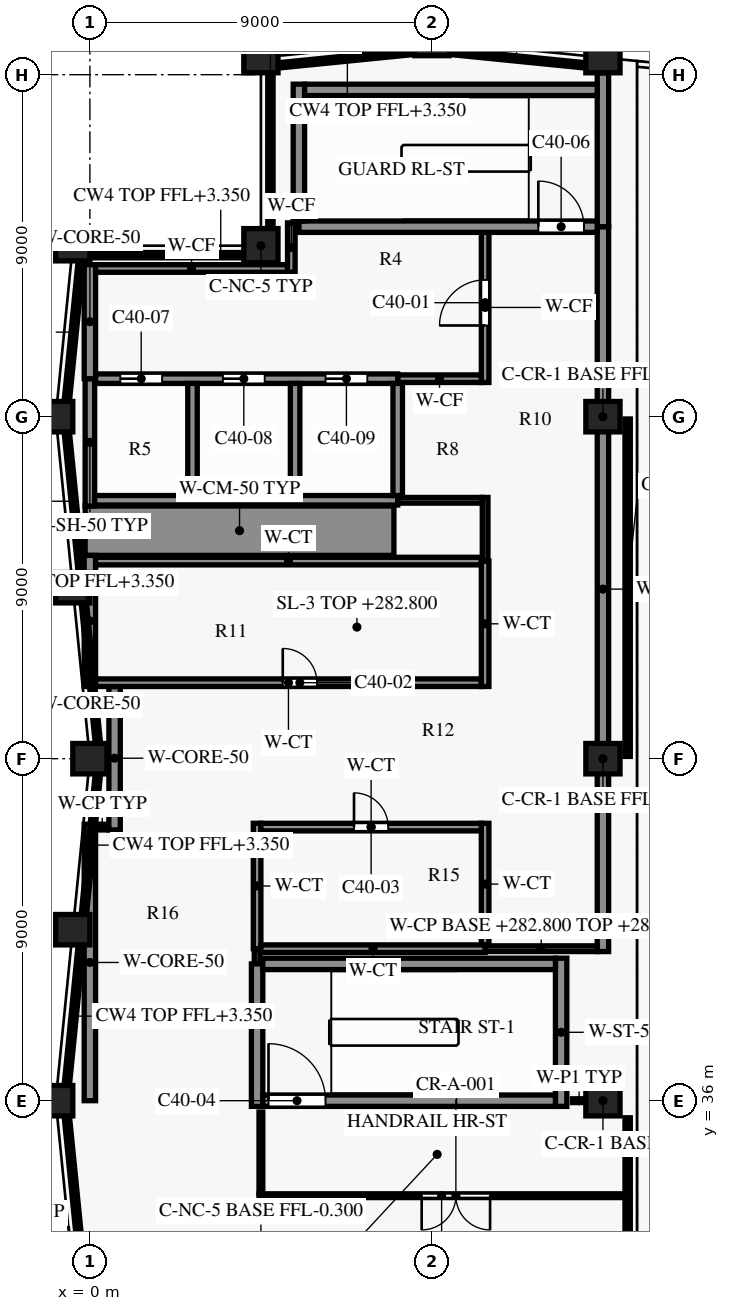
"""IFC4 building model, lengths in metres.
Left out: names, types, materials, properties, quantities, classifications, styles, units other than length and angle.
Written with IfcOpenShell. Run it as: python <this file> out.ifc"""

import sys

from ifc_helpers import new_model, si_unit, direction, frame, frame_2d, origin, origin_2d, place, context, subcontext, project, spatial, rectangle, extrude, element, fill, save


model = new_model("IFC4")
c1 = context("Model", 3, precision=1e-05, world=origin(), true_north=direction((0.0, 1.0)))
c2 = subcontext(c1, "Body", "Model", "MODEL_VIEW")
j1 = project(units=[si_unit("LENGTHUNIT", "METRE"), si_unit("PLANEANGLEUNIT", "RADIAN")], contexts=[c1])
p1 = place(None, origin())
s1 = spatial("IfcSite", under=j1, at=p1, CompositionType="ELEMENT")
p2 = place(p1, origin())
s2 = spatial("IfcBuilding", under=s1, at=p2, CompositionType="ELEMENT")
p3 = place(p2, frame((0.0, 0.0, 282.8)))
s3 = spatial("IfcBuildingStorey", under=s2, at=p3, CompositionType="ELEMENT", Elevation=282.8)
for number, where, z_axis, x_axis in (
    (1, (13.5, 36.0, -0.3), (0.0, 0.0, 1.0), (1.0, 0.0, 0.0)),
    (2, (13.5, 45.0, -0.3), (0.0, 0.0, 1.0), (1.0, 0.0, 0.0)),
    (3, (13.5, 54.0, -0.3), (0.0, 0.0, 1.0), (1.0, 0.0, 0.0)),
):
    element("IfcColumn", number, at=place(p3, frame(where, z_axis=z_axis, x_axis=x_axis)), inside=s3, PredefinedType="COLUMN", context=c2, shape_type="SweptSolid", body=[
        extrude(rectangle(XDim=0.9, YDim=0.8, at=origin_2d()), origin(), (0.0, 0.0, 1.0), 4.3),
    ])
for number, where, z_axis, x_axis in (
    (4, (13.5, 63.45, 0.0), (0.0, 0.0, 1.0), (-0.995, 0.1, 0.0)),
    (5, (9.0, 63.9, 0.0), (0.0, 0.0, 1.0), (-1.0, 0.0, 0.0)),
    (6, (4.5, 63.45, 0.0), (0.0, 0.0, 1.0), (-0.995, -0.1, 0.0)),
    (7, (-0.45, 58.5, 0.0), (0.0, 0.0, 1.0), (-0.1, -0.995, 0.0)),
    (8, (-0.9, 54.0, 0.0), (0.0, 0.0, 1.0), (0.0, -1.0, 0.0)),
    (9, (-0.45, 49.5, 0.0), (0.0, 0.0, 1.0), (0.1, -0.995, 0.0)),
    (10, (0.0, 45.0, 0.0), (0.0, 0.0, 1.0), (0.0, -1.0, 0.0)),
    (11, (-0.45, 40.5, 0.0), (0.0, 0.0, 1.0), (-0.1, -0.995, 0.0)),
    (12, (-0.9, 36.0, 0.0), (0.0, 0.0, 1.0), (0.0, -1.0, 0.0)),
):
    element("IfcColumn", number, at=place(p3, frame(where, z_axis=z_axis, x_axis=x_axis)), inside=s3, PredefinedType="COLUMN", context=c2, shape_type="SweptSolid", body=[
        extrude(rectangle(XDim=0.9, YDim=0.8, at=origin_2d()), origin(), (0.0, 0.0, 1.0), 4.0),
    ])
p4 = place(p3, frame((4.5, 58.5, 0.0), z_axis=(0.0, 0.0, 1.0), x_axis=(1.0, 0.0, 0.0)))
e13 = element("IfcColumn", 13, at=p4, inside=s3, PredefinedType="COLUMN", context=c2, shape_type="SweptSolid", body=[
    extrude(rectangle(XDim=0.9, YDim=0.9, at=origin_2d()), origin(), (0.0, 0.0, 1.0), 4.0),
])
p5 = place(p3, frame((4.55, 36.0, 0.0), z_axis=(0.0, 0.0, 1.0), x_axis=(1.0, 0.0, 0.0)))
e14 = element("IfcWall", 14, at=p5, inside=s3, PredefinedType="SHEAR", context=c2, shape_type="SweptSolid", body=[
    extrude(rectangle(XDim=7.7, YDim=0.3, at=frame_2d((3.85, 0.0))), origin(), (0.0, 0.0, 1.0), 3.7),
])
p6 = place(p5, frame((0.15, 0.0, 0.0)))
e15 = element("IfcOpeningElement", 15, at=p6, cuts=e14, PredefinedType="OPENING", context=c2, shape_type="SweptSolid", body=[
    extrude(rectangle(XDim=1.5, YDim=2.2, at=frame_2d((0.75, 1.1))), frame((0.0, 0.16, 0.0), z_axis=(0.0, -1.0, 0.0), x_axis=(1.0, 0.0, 0.0)), (0.0, 0.0, 1.0), 0.32),
])
p7 = place(p3, frame((4.55, 39.6, 0.0), z_axis=(0.0, 0.0, 1.0), x_axis=(1.0, 0.0, 0.0)))
e16 = element("IfcWall", 16, at=p7, inside=s3, PredefinedType="SHEAR", context=c2, shape_type="SweptSolid", body=[
    extrude(rectangle(XDim=7.7, YDim=0.3, at=frame_2d((3.85, 0.0))), origin(), (0.0, 0.0, 1.0), 3.7),
])
p8 = place(p3, frame((10.4, 40.0, 0.0), z_axis=(0.0, 0.0, 1.0), x_axis=(1.0, 0.0, 0.0)))
e17 = element("IfcWall", 17, at=p8, inside=s3, PredefinedType="PARTITIONING", context=c2, shape_type="SweptSolid", body=[
    extrude(rectangle(XDim=2.95, YDim=0.15, at=frame_2d((1.475, 0.0))), origin(), (0.0, 0.0, 1.0), 3.35),
])
p9 = place(p3, frame((4.5, 40.0, 0.0), z_axis=(0.0, 0.0, 1.0), x_axis=(1.0, 0.0, 0.0)))
e18 = element("IfcWall", 18, at=p9, inside=s3, PredefinedType="PARTITIONING", context=c2, shape_type="SweptSolid", body=[
    extrude(rectangle(XDim=5.9, YDim=0.2, at=frame_2d((2.95, 0.0))), origin(), (0.0, 0.0, 1.0), 3.7),
])
p10 = place(p3, frame((0.15, 43.2, 0.0), z_axis=(0.0, 0.0, 1.0), x_axis=(1.0, 0.0, 0.0)))
e19 = element("IfcWall", 19, at=p10, inside=s3, PredefinedType="PARTITIONING", context=c2, shape_type="SweptSolid", body=[
    extrude(rectangle(XDim=0.35, YDim=0.15, at=frame_2d((0.175, 0.0))), origin(), (0.0, 0.0, 1.0), 3.7),
])
p11 = place(p3, frame((4.5, 43.2, 0.0), z_axis=(0.0, 0.0, 1.0), x_axis=(1.0, 0.0, 0.0)))
e20 = element("IfcWall", 20, at=p11, inside=s3, PredefinedType="PARTITIONING", context=c2, shape_type="SweptSolid", body=[
    extrude(rectangle(XDim=5.8, YDim=0.2, at=frame_2d((2.9, 0.0))), origin(), (0.0, 0.0, 1.0), 3.7),
])
p12 = place(p11, frame((2.45, 0.0, 0.0)))
e21 = element("IfcOpeningElement", 21, at=p12, cuts=e20, PredefinedType="OPENING", context=c2, shape_type="SweptSolid", body=[
    extrude(rectangle(XDim=0.9, YDim=2.1, at=frame_2d((0.45, 1.05))), frame((0.0, 0.11, 0.0), z_axis=(0.0, -1.0, 0.0), x_axis=(1.0, 0.0, 0.0)), (0.0, 0.0, 1.0), 0.22),
])
p13 = place(p3, frame((0.15, 47.0, 0.0), z_axis=(0.0, 0.0, 1.0), x_axis=(1.0, 0.0, 0.0)))
e22 = element("IfcWall", 22, at=p13, inside=s3, PredefinedType="PARTITIONING", context=c2, shape_type="SweptSolid", body=[
    extrude(rectangle(XDim=10.15, YDim=0.2, at=frame_2d((5.075, 0.0))), origin(), (0.0, 0.0, 1.0), 3.7),
])
p14 = place(p13, frame((4.925, 0.0, 0.0)))
e23 = element("IfcOpeningElement", 23, at=p14, cuts=e22, PredefinedType="OPENING", context=c2, shape_type="SweptSolid", body=[
    extrude(rectangle(XDim=0.9, YDim=2.1, at=frame_2d((0.45, 1.05))), frame((0.0, 0.11, 0.0), z_axis=(0.0, -1.0, 0.0), x_axis=(1.0, 0.0, 0.0)), (0.0, 0.0, 1.0), 0.22),
])
p15 = place(p3, frame((0.15, 50.2, 0.0), z_axis=(0.0, 0.0, 1.0), x_axis=(1.0, 0.0, 0.0)))
e24 = element("IfcWall", 24, at=p15, inside=s3, PredefinedType="PARTITIONING", context=c2, shape_type="SweptSolid", body=[
    extrude(rectangle(XDim=10.15, YDim=0.2, at=frame_2d((5.075, 0.0))), origin(), (0.0, 0.0, 1.0), 3.7),
])
p16 = place(p3, frame((-0.125, 51.0, 0.0), z_axis=(0.0, 0.0, 1.0), x_axis=(1.0, 0.0, 0.0)))
e25 = element("IfcWall", 25, at=p16, inside=s3, PredefinedType="SHEAR", context=c2, shape_type="SweptSolid", body=[
    extrude(rectangle(XDim=8.125, YDim=1.3, at=frame_2d((4.062, 0.0))), origin(), (0.0, 0.0, 1.0), 3.7),
])
p17 = place(p3, frame((8.1, 51.8, 0.0), z_axis=(0.0, 0.0, 1.0), x_axis=(1.0, 0.0, 0.0)))
e26 = element("IfcWall", 26, at=p17, inside=s3, PredefinedType="PARTITIONING", context=c2, shape_type="SweptSolid", body=[
    extrude(rectangle(XDim=2.225, YDim=0.15, at=frame_2d((1.112, 0.0))), origin(), (0.0, 0.0, 1.0), 3.7),
])
p18 = place(p3, frame((0.125, 51.8, 0.0), z_axis=(0.0, 0.0, 1.0), x_axis=(1.0, 0.0, 0.0)))
e27 = element("IfcWall", 27, at=p18, inside=s3, PredefinedType="SHEAR", context=c2, shape_type="SweptSolid", body=[
    extrude(rectangle(XDim=7.975, YDim=0.25, at=frame_2d((3.988, 0.0))), origin(), (0.0, 0.0, 1.0), 3.7),
])
p19 = place(p3, frame((8.1, 55.0, 0.0), z_axis=(0.0, 0.0, 1.0), x_axis=(1.0, 0.0, 0.0)))
e28 = element("IfcWall", 28, at=p19, inside=s3, PredefinedType="PARTITIONING", context=c2, shape_type="SweptSolid", body=[
    extrude(rectangle(XDim=2.2, YDim=0.2, at=frame_2d((1.1, 0.0))), origin(), (0.0, 0.0, 1.0), 3.7),
])
p20 = place(p3, frame((0.15, 55.0, 0.0), z_axis=(0.0, 0.0, 1.0), x_axis=(1.0, 0.0, 0.0)))
e29 = element("IfcWall", 29, at=p20, inside=s3, PredefinedType="SHEAR", context=c2, shape_type="SweptSolid", body=[
    extrude(rectangle(XDim=7.95, YDim=0.25, at=frame_2d((3.975, 0.0))), origin(), (0.0, 0.0, 1.0), 3.7),
])
p21 = place(p20, frame((0.65, 0.0, 0.0)))
e30 = element("IfcOpeningElement", 30, at=p21, cuts=e29, PredefinedType="OPENING", context=c2, shape_type="SweptSolid", body=[
    extrude(rectangle(XDim=1.1, YDim=2.1, at=frame_2d((0.55, 1.05))), frame((0.0, 0.135, 0.0), z_axis=(0.0, -1.0, 0.0), x_axis=(1.0, 0.0, 0.0)), (0.0, 0.0, 1.0), 0.27),
])
p22 = place(p20, frame((3.35, 0.0, 0.0)))
e31 = element("IfcOpeningElement", 31, at=p22, cuts=e29, PredefinedType="OPENING", context=c2, shape_type="SweptSolid", body=[
    extrude(rectangle(XDim=1.1, YDim=2.1, at=frame_2d((0.55, 1.05))), frame((0.0, 0.135, 0.0), z_axis=(0.0, -1.0, 0.0), x_axis=(1.0, 0.0, 0.0)), (0.0, 0.0, 1.0), 0.27),
])
p23 = place(p20, frame((6.05, 0.0, 0.0)))
e32 = element("IfcOpeningElement", 32, at=p23, cuts=e29, PredefinedType="OPENING", context=c2, shape_type="SweptSolid", body=[
    extrude(rectangle(XDim=1.1, YDim=2.1, at=frame_2d((0.55, 1.05))), frame((0.0, 0.135, 0.0), z_axis=(0.0, -1.0, 0.0), x_axis=(1.0, 0.0, 0.0)), (0.0, 0.0, 1.0), 0.27),
])
p24 = place(p3, frame((0.15, 57.9, 0.0), z_axis=(0.0, 0.0, 1.0), x_axis=(1.0, 0.0, 0.0)))
e33 = element("IfcWall", 33, at=p24, inside=s3, PredefinedType="PARTITIONING", context=c2, shape_type="SweptSolid", body=[
    extrude(rectangle(XDim=5.05, YDim=0.2, at=frame_2d((2.525, 0.0))), origin(), (0.0, 0.0, 1.0), 3.7),
])
p25 = place(p3, frame((5.5, 59.0, 0.0), z_axis=(0.0, 0.0, 1.0), x_axis=(1.0, 0.0, 0.0)))
e34 = element("IfcWall", 34, at=p25, inside=s3, PredefinedType="SHEAR", context=c2, shape_type="SweptSolid", body=[
    extrude(rectangle(XDim=7.85, YDim=0.3, at=frame_2d((3.925, 0.0))), origin(), (0.0, 0.0, 1.0), 3.7),
])
p26 = place(p25, frame((6.3, 0.0, 0.0)))
e35 = element("IfcOpeningElement", 35, at=p26, cuts=e34, PredefinedType="OPENING", context=c2, shape_type="SweptSolid", body=[
    extrude(rectangle(XDim=1.2, YDim=2.2, at=frame_2d((0.6, 1.1))), frame((0.0, 0.16, 0.0), z_axis=(0.0, -1.0, 0.0), x_axis=(1.0, 0.0, 0.0)), (0.0, 0.0, 1.0), 0.32),
])
p27 = place(p3, frame((5.65, 62.6, 0.0), z_axis=(0.0, 0.0, 1.0), x_axis=(1.0, 0.0, 0.0)))
e36 = element("IfcWall", 36, at=p27, inside=s3, PredefinedType="SHEAR", context=c2, shape_type="SweptSolid", body=[
    extrude(rectangle(XDim=7.7, YDim=0.3, at=frame_2d((3.85, 0.0))), origin(), (0.0, 0.0, 1.0), 3.7),
])
p28 = place(p3, frame((0.0, 36.0, 0.0), z_axis=(0.0, 0.0, 1.0), x_axis=(0.0, 1.0, 0.0)))
e37 = element("IfcWall", 37, at=p28, inside=s3, PredefinedType="SHEAR", context=c2, shape_type="SweptSolid", body=[
    extrude(rectangle(XDim=7.275, YDim=0.3, at=frame_2d((3.637, 0.0))), origin(), (0.0, 0.0, 1.0), 3.7),
])
p29 = place(p3, frame((0.0, 46.9, 0.0), z_axis=(0.0, 0.0, 1.0), x_axis=(0.0, 1.0, 0.0)))
e38 = element("IfcWall", 38, at=p29, inside=s3, PredefinedType="SHEAR", context=c2, shape_type="SweptSolid", body=[
    extrude(rectangle(XDim=3.45, YDim=0.3, at=frame_2d((1.725, 0.0))), origin(), (0.0, 0.0, 1.0), 3.7),
])
p30 = place(p3, frame((0.0, 55.0, 0.0), z_axis=(0.0, 0.0, 1.0), x_axis=(0.0, 1.0, 0.0)))
e39 = element("IfcWall", 39, at=p30, inside=s3, PredefinedType="SHEAR", context=c2, shape_type="SweptSolid", body=[
    extrude(rectangle(XDim=3.0, YDim=0.3, at=frame_2d((1.5, 0.0))), origin(), (0.0, 0.0, 1.0), 3.7),
])
p31 = place(p3, frame((0.0, 51.65, 0.0), z_axis=(0.0, 0.0, 1.0), x_axis=(0.0, 1.0, 0.0)))
e40 = element("IfcWall", 40, at=p31, inside=s3, PredefinedType="SHEAR", context=c2, shape_type="SweptSolid", body=[
    extrude(rectangle(XDim=3.35, YDim=0.25, at=frame_2d((1.675, 0.0))), origin(), (0.0, 0.0, 1.0), 3.7),
])
p32 = place(p3, frame((0.65, 43.125, 0.0), z_axis=(0.0, 0.0, 1.0), x_axis=(0.0, 1.0, 0.0)))
e41 = element("IfcWall", 41, at=p32, inside=s3, PredefinedType="SHEAR", context=c2, shape_type="SweptSolid", body=[
    extrude(rectangle(XDim=3.775, YDim=0.3, at=frame_2d((1.887, 0.0))), origin(), (0.0, 0.0, 1.0), 3.7),
])
p33 = place(p3, frame((2.7, 51.925, 0.0), z_axis=(0.0, 0.0, 1.0), x_axis=(0.0, 1.0, 0.0)))
e42 = element("IfcWall", 42, at=p33, inside=s3, PredefinedType="SHEAR", context=c2, shape_type="SweptSolid", body=[
    extrude(rectangle(XDim=2.95, YDim=0.25, at=frame_2d((1.475, 0.0))), origin(), (0.0, 0.0, 1.0), 3.7),
])
p34 = place(p3, frame((4.4, 39.6, 0.0), z_axis=(0.0, 0.0, 1.0), x_axis=(0.0, 1.0, 0.0)))
e43 = element("IfcWall", 43, at=p34, inside=s3, PredefinedType="PARTITIONING", context=c2, shape_type="SweptSolid", body=[
    extrude(rectangle(XDim=0.4, YDim=0.15, at=frame_2d((0.2, 0.0))), origin(), (0.0, 0.0, 1.0), 3.7),
])
p35 = place(p3, frame((4.4, 40.0, 0.0), z_axis=(0.0, 0.0, 1.0), x_axis=(0.0, 1.0, 0.0)))
e44 = element("IfcWall", 44, at=p35, inside=s3, PredefinedType="PARTITIONING", context=c2, shape_type="SweptSolid", body=[
    extrude(rectangle(XDim=3.3, YDim=0.2, at=frame_2d((1.65, 0.0))), origin(), (0.0, 0.0, 1.0), 3.7),
])
p36 = place(p3, frame((4.4, 35.85, 0.0), z_axis=(0.0, 0.0, 1.0), x_axis=(0.0, 1.0, 0.0)))
e45 = element("IfcWall", 45, at=p36, inside=s3, PredefinedType="SHEAR", context=c2, shape_type="SweptSolid", body=[
    extrude(rectangle(XDim=3.75, YDim=0.3, at=frame_2d((1.875, 0.0))), origin(), (0.0, 0.0, 1.0), 3.7),
])
p37 = place(p3, frame((5.3, 57.8, 0.0), z_axis=(0.0, 0.0, 1.0), x_axis=(0.0, 1.0, 0.0)))
e46 = element("IfcWall", 46, at=p37, inside=s3, PredefinedType="PARTITIONING", context=c2, shape_type="SweptSolid", body=[
    extrude(rectangle(XDim=1.3, YDim=0.2, at=frame_2d((0.65, 0.0))), origin(), (0.0, 0.0, 1.0), 3.7),
])
p38 = place(p3, frame((5.4, 51.925, 0.0), z_axis=(0.0, 0.0, 1.0), x_axis=(0.0, 1.0, 0.0)))
e47 = element("IfcWall", 47, at=p38, inside=s3, PredefinedType="SHEAR", context=c2, shape_type="SweptSolid", body=[
    extrude(rectangle(XDim=2.95, YDim=0.25, at=frame_2d((1.475, 0.0))), origin(), (0.0, 0.0, 1.0), 3.7),
])
p39 = place(p3, frame((5.5, 59.15, 0.0), z_axis=(0.0, 0.0, 1.0), x_axis=(0.0, 1.0, 0.0)))
e48 = element("IfcWall", 48, at=p39, inside=s3, PredefinedType="SHEAR", context=c2, shape_type="SweptSolid", body=[
    extrude(rectangle(XDim=3.6, YDim=0.3, at=frame_2d((1.8, 0.0))), origin(), (0.0, 0.0, 1.0), 3.7),
])
p40 = place(p3, frame((8.1, 51.925, 0.0), z_axis=(0.0, 0.0, 1.0), x_axis=(0.0, 1.0, 0.0)))
e49 = element("IfcWall", 49, at=p40, inside=s3, PredefinedType="SHEAR", context=c2, shape_type="SweptSolid", body=[
    extrude(rectangle(XDim=2.95, YDim=0.25, at=frame_2d((1.475, 0.0))), origin(), (0.0, 0.0, 1.0), 3.7),
])
p41 = place(p3, frame((10.4, 54.9, 0.0), z_axis=(0.0, 0.0, 1.0), x_axis=(0.0, 1.0, 0.0)))
e50 = element("IfcWall", 50, at=p41, inside=s3, PredefinedType="PARTITIONING", context=c2, shape_type="SweptSolid", body=[
    extrude(rectangle(XDim=3.95, YDim=0.2, at=frame_2d((1.975, 0.0))), origin(), (0.0, 0.0, 1.0), 3.7),
])
p42 = place(p41, frame((1.5, 0.0, 0.0)))
e51 = element("IfcOpeningElement", 51, at=p42, cuts=e50, PredefinedType="OPENING", context=c2, shape_type="SweptSolid", body=[
    extrude(rectangle(XDim=1.2, YDim=2.2, at=frame_2d((0.6, 1.1))), frame((0.0, 0.11, 0.0), z_axis=(0.0, -1.0, 0.0), x_axis=(1.0, 0.0, 0.0)), (0.0, 0.0, 1.0), 0.22),
])
p43 = place(p3, frame((10.4, 50.2, 0.0), z_axis=(0.0, 0.0, 1.0), x_axis=(0.0, 1.0, 0.0)))
e52 = element("IfcWall", 52, at=p43, inside=s3, PredefinedType="PARTITIONING", context=c2, shape_type="SweptSolid", body=[
    extrude(rectangle(XDim=1.675, YDim=0.15, at=frame_2d((0.837, 0.0))), origin(), (0.0, 0.0, 1.0), 3.7),
])
p44 = place(p3, frame((10.4, 40.1, 0.0), z_axis=(0.0, 0.0, 1.0), x_axis=(0.0, 1.0, 0.0)))
e53 = element("IfcWall", 53, at=p44, inside=s3, PredefinedType="PARTITIONING", context=c2, shape_type="SweptSolid", body=[
    extrude(rectangle(XDim=3.2, YDim=0.2, at=frame_2d((1.6, 0.0))), origin(), (0.0, 0.0, 1.0), 3.7),
])
p45 = place(p3, frame((10.4, 46.9, 0.0), z_axis=(0.0, 0.0, 1.0), x_axis=(0.0, 1.0, 0.0)))
e54 = element("IfcWall", 54, at=p45, inside=s3, PredefinedType="PARTITIONING", context=c2, shape_type="SweptSolid", body=[
    extrude(rectangle(XDim=3.3, YDim=0.2, at=frame_2d((1.65, 0.0))), origin(), (0.0, 0.0, 1.0), 3.7),
])
p46 = place(p3, frame((12.4, 35.85, 0.0), z_axis=(0.0, 0.0, 1.0), x_axis=(0.0, 1.0, 0.0)))
e55 = element("IfcWall", 55, at=p46, inside=s3, PredefinedType="SHEAR", context=c2, shape_type="SweptSolid", body=[
    extrude(rectangle(XDim=3.9, YDim=0.3, at=frame_2d((1.95, 0.0))), origin(), (0.0, 0.0, 1.0), 3.7),
])
p47 = place(p3, frame((13.5, 39.925, 0.0), z_axis=(0.0, 0.0, 1.0), x_axis=(0.0, 1.0, 0.0)))
e56 = element("IfcWall", 56, at=p47, inside=s3, PredefinedType="SHEAR", context=c2, shape_type="SweptSolid", body=[
    extrude(rectangle(XDim=19.075, YDim=0.3, at=frame_2d((9.538, 0.0))), origin(), (0.0, 0.0, 1.0), 3.7),
])
p48 = place(p3, frame((13.5, 59.0, 0.0), z_axis=(0.0, 0.0, 1.0), x_axis=(0.0, 1.0, 0.0)))
e57 = element("IfcWall", 57, at=p48, inside=s3, PredefinedType="SHEAR", context=c2, shape_type="SweptSolid", body=[
    extrude(rectangle(XDim=4.048, YDim=0.3, at=frame_2d((2.024, 0.0))), origin(), (0.0, 0.0, 1.0), 3.7),
])
p49 = place(p3, frame((14.06, 33.5, 0.0), z_axis=(0.0, 0.0, 1.0), x_axis=(-1.0, 0.0, 0.0)))
e58 = element("IfcWall", 58, at=p49, inside=s3, PredefinedType="PARTITIONING", context=c2, shape_type="SweptSolid", body=[
    extrude(rectangle(XDim=9.61, YDim=0.1, at=frame_2d((4.805, 0.0))), origin(), (0.0, 0.0, 1.0), 3.33),
])
p50 = place(p49, frame((3.53, 0.0, 0.0)))
e59 = element("IfcOpeningElement", 59, at=p50, cuts=e58, PredefinedType="OPENING", context=c2, shape_type="SweptSolid", body=[
    extrude(rectangle(XDim=1.8, YDim=2.1, at=frame_2d((0.9, 1.05))), frame((0.0, 0.06, 0.0), z_axis=(0.0, -1.0, 0.0), x_axis=(1.0, 0.0, 0.0)), (0.0, 0.0, 1.0), 0.12),
])
p51 = place(p3, frame((4.5, 33.55, 0.0), z_axis=(0.0, 0.0, 1.0), x_axis=(0.0, 1.0, 0.0)))
e60 = element("IfcWall", 60, at=p51, inside=s3, PredefinedType="PARTITIONING", context=c2, shape_type="SweptSolid", body=[
    extrude(rectangle(XDim=2.15, YDim=0.1, at=frame_2d((1.075, 0.0))), origin(), (0.0, 0.0, 1.0), 3.68),
])
p52 = place(p3, frame((12.7, 36.0, 0.0), z_axis=(0.0, 0.0, 1.0), x_axis=(1.0, 0.0, 0.0)))
e61 = element("IfcWall", 61, at=p52, inside=s3, PredefinedType="PARTITIONING", context=c2, shape_type="SweptSolid", body=[
    extrude(rectangle(XDim=0.345, YDim=0.1, at=frame_2d((0.172, 0.0))), origin(), (0.0, 0.0, 1.0), 3.68),
])
p53 = place(p42, origin())
e62 = element("IfcDoor", 62, at=p53, inside=s3, OperationType="SINGLE_SWING_RIGHT", PredefinedType="DOOR", context=c2, shape_type="SweptSolid", body=[
    extrude(rectangle(XDim=1.2, YDim=2.2, at=frame_2d((0.6, 1.1))), frame((0.0, 0.025, 0.0), z_axis=(0.0, -1.0, 0.0), x_axis=(1.0, 0.0, 0.0)), (0.0, 0.0, 1.0), 0.05),
])
fill(e51, e62)
p54 = place(p14, origin())
e63 = element("IfcDoor", 63, at=p54, inside=s3, OperationType="SINGLE_SWING_RIGHT", PredefinedType="DOOR", context=c2, shape_type="SweptSolid", body=[
    extrude(rectangle(XDim=0.9, YDim=2.1, at=frame_2d((0.45, 1.05))), frame((0.0, 0.025, 0.0), z_axis=(0.0, -1.0, 0.0), x_axis=(1.0, 0.0, 0.0)), (0.0, 0.0, 1.0), 0.05),
])
fill(e23, e63)
p55 = place(p12, origin())
e64 = element("IfcDoor", 64, at=p55, inside=s3, OperationType="SINGLE_SWING_LEFT", PredefinedType="DOOR", context=c2, shape_type="SweptSolid", body=[
    extrude(rectangle(XDim=0.9, YDim=2.1, at=frame_2d((0.45, 1.05))), frame((0.0, 0.025, 0.0), z_axis=(0.0, -1.0, 0.0), x_axis=(1.0, 0.0, 0.0)), (0.0, 0.0, 1.0), 0.05),
])
fill(e21, e64)
p56 = place(p6, origin())
e65 = element("IfcDoor", 65, at=p56, inside=s3, OperationType="SINGLE_SWING_RIGHT", PredefinedType="DOOR", context=c2, shape_type="SweptSolid", body=[
    extrude(rectangle(XDim=1.5, YDim=2.2, at=frame_2d((0.75, 1.1))), frame((0.0, 0.025, 0.0), z_axis=(0.0, -1.0, 0.0), x_axis=(1.0, 0.0, 0.0)), (0.0, 0.0, 1.0), 0.05),
])
fill(e15, e65)
p57 = place(p26, origin())
e66 = element("IfcDoor", 66, at=p57, inside=s3, OperationType="SINGLE_SWING_RIGHT", PredefinedType="DOOR", context=c2, shape_type="SweptSolid", body=[
    extrude(rectangle(XDim=1.2, YDim=2.2, at=frame_2d((0.6, 1.1))), frame((0.0, 0.025, 0.0), z_axis=(0.0, -1.0, 0.0), x_axis=(1.0, 0.0, 0.0)), (0.0, 0.0, 1.0), 0.05),
])
fill(e35, e66)
p58 = place(p21, origin())
e67 = element("IfcDoor", 67, at=p58, inside=s3, OperationType="DOUBLE_DOOR_SLIDING", PredefinedType="DOOR", context=c2, shape_type="SweptSolid", body=[
    extrude(rectangle(XDim=1.1, YDim=2.1, at=frame_2d((0.55, 1.05))), frame((0.0, 0.025, 0.0), z_axis=(0.0, -1.0, 0.0), x_axis=(1.0, 0.0, 0.0)), (0.0, 0.0, 1.0), 0.05),
])
fill(e30, e67)
p59 = place(p22, origin())
e68 = element("IfcDoor", 68, at=p59, inside=s3, OperationType="DOUBLE_DOOR_SLIDING", PredefinedType="DOOR", context=c2, shape_type="SweptSolid", body=[
    extrude(rectangle(XDim=1.1, YDim=2.1, at=frame_2d((0.55, 1.05))), frame((0.0, 0.025, 0.0), z_axis=(0.0, -1.0, 0.0), x_axis=(1.0, 0.0, 0.0)), (0.0, 0.0, 1.0), 0.05),
])
fill(e31, e68)
p60 = place(p23, origin())
e69 = element("IfcDoor", 69, at=p60, inside=s3, OperationType="DOUBLE_DOOR_SLIDING", PredefinedType="DOOR", context=c2, shape_type="SweptSolid", body=[
    extrude(rectangle(XDim=1.1, YDim=2.1, at=frame_2d((0.55, 1.05))), frame((0.0, 0.025, 0.0), z_axis=(0.0, -1.0, 0.0), x_axis=(1.0, 0.0, 0.0)), (0.0, 0.0, 1.0), 0.05),
])
fill(e32, e69)
p61 = place(p50, origin())
e70 = element("IfcDoor", 70, at=p61, inside=s3, OperationType="DOUBLE_DOOR_SINGLE_SWING", PredefinedType="DOOR", context=c2, shape_type="SweptSolid", body=[
    extrude(rectangle(XDim=1.8, YDim=2.1, at=frame_2d((0.9, 1.05))), frame((0.0, 0.025, 0.0), z_axis=(0.0, -1.0, 0.0), x_axis=(1.0, 0.0, 0.0)), (0.0, 0.0, 1.0), 0.05),
])
fill(e59, e70)
save(model, sys.argv[1])
